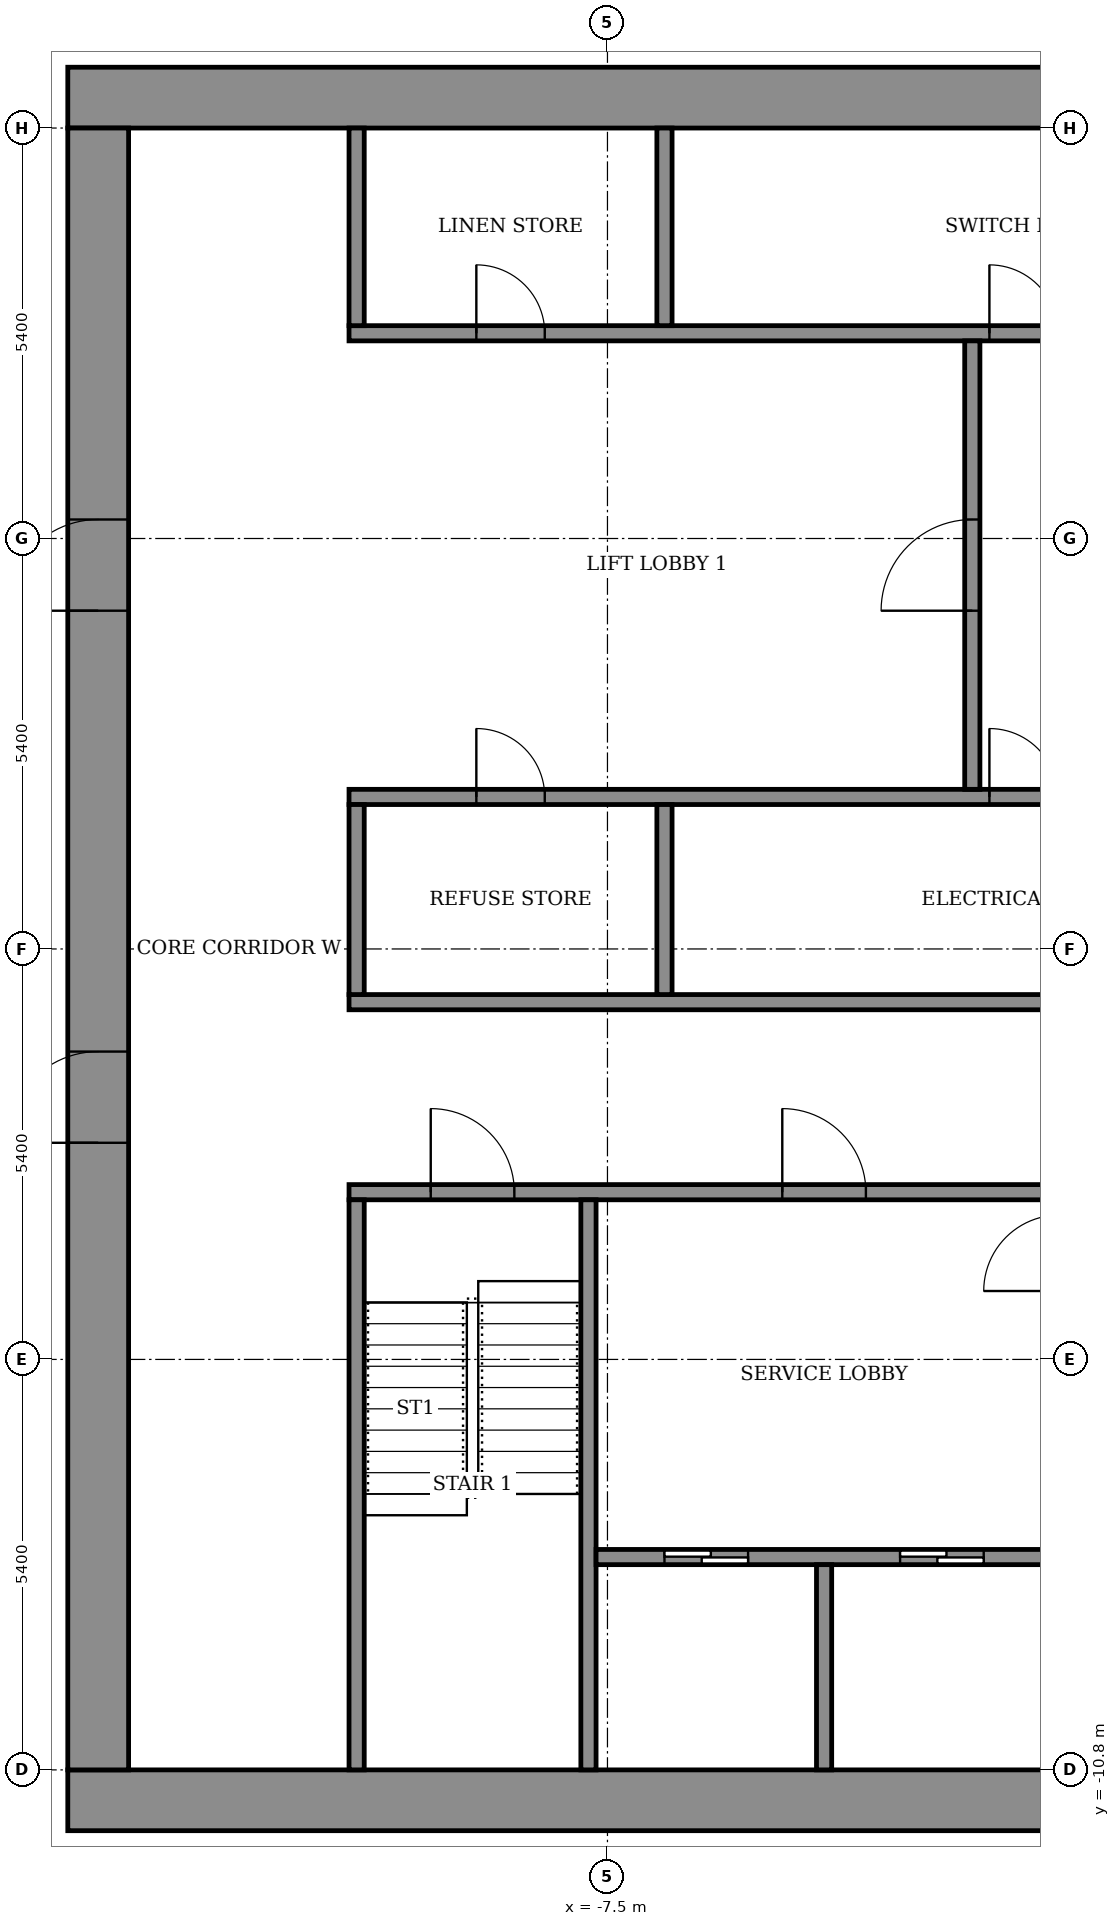
"""IFC4 building model, lengths in metres.
Left out: names, types, materials, properties, quantities, classifications, styles, units other than length and angle.
Written with IfcOpenShell. Run it as: python <this file> out.ifc"""

import sys

from ifc_helpers import new_model, si_unit, direction, frame, frame_2d, origin, place, context, subcontext, project, spatial, rectangle, extrude, element, fill, save


model = new_model("IFC4")
c1 = context("Model", 3, precision=1e-05, world=origin(), true_north=direction((0.0, 1.0)))
c2 = subcontext(c1, "Body", "Model", "MODEL_VIEW")
j1 = project(units=[si_unit("LENGTHUNIT", "METRE"), si_unit("PLANEANGLEUNIT", "RADIAN")], contexts=[c1])
p1 = place(None, origin())
s1 = spatial("IfcSite", under=j1, at=p1, CompositionType="ELEMENT")
p2 = place(p1, origin())
s2 = spatial("IfcBuilding", under=s1, at=p2, CompositionType="ELEMENT")
p3 = place(p2, frame((0.0, 0.0, 205.1)))
s3 = spatial("IfcBuildingStorey", under=s2, at=p3, CompositionType="ELEMENT", Elevation=205.1)
for number, where, z_axis, x_axis in (
    (1, (-14.6, -11.2, 0.0), (0.0, 0.0, 1.0), (1.0, 0.0, 0.0)),
    (2, (-14.6, 11.2, 0.0), (0.0, 0.0, 1.0), (1.0, 0.0, 0.0)),
):
    element("IfcWall", number, at=place(p3, frame(where, z_axis=z_axis, x_axis=x_axis)), inside=s3, PredefinedType="SHEAR", context=c2, shape_type="SweptSolid", body=[
        extrude(rectangle(XDim=29.2, YDim=0.8, at=frame_2d((14.6, 0.0))), origin(), (0.0, 0.0, 1.0), 3.6),
    ])
p4 = place(p3, frame((-14.2, -10.8, 0.0), z_axis=(0.0, 0.0, 1.0), x_axis=(0.0, 1.0, 0.0)))
e3 = element("IfcWall", 3, at=p4, inside=s3, PredefinedType="SHEAR", context=c2, shape_type="SweptSolid", body=[
    extrude(rectangle(XDim=21.6, YDim=0.8, at=frame_2d((10.8, 0.0))), origin(), (0.0, 0.0, 1.0), 3.6),
])
p5 = place(p4, frame((8.25, 0.0, 0.0)))
e4 = element("IfcOpeningElement", 4, at=p5, cuts=e3, PredefinedType="OPENING", context=c2, shape_type="SweptSolid", body=[
    extrude(rectangle(XDim=1.2, YDim=2.1, at=frame_2d((0.6, 1.05))), frame((0.0, 0.41, 0.0), z_axis=(0.0, -1.0, 0.0), x_axis=(1.0, 0.0, 0.0)), (0.0, 0.0, 1.0), 0.82),
])
p6 = place(p4, frame((15.25, 0.0, 0.0)))
e5 = element("IfcOpeningElement", 5, at=p6, cuts=e3, PredefinedType="OPENING", context=c2, shape_type="SweptSolid", body=[
    extrude(rectangle(XDim=1.2, YDim=2.1, at=frame_2d((0.6, 1.05))), frame((0.0, 0.41, 0.0), z_axis=(0.0, -1.0, 0.0), x_axis=(1.0, 0.0, 0.0)), (0.0, 0.0, 1.0), 0.82),
])
p7 = place(p3, frame((-10.9, -3.2, 0.0), z_axis=(0.0, 0.0, 1.0), x_axis=(1.0, 0.0, 0.0)))
e6 = element("IfcWall", 6, at=p7, inside=s3, PredefinedType="SHEAR", context=c2, shape_type="SweptSolid", body=[
    extrude(rectangle(XDim=21.8, YDim=0.2, at=frame_2d((10.9, 0.0))), origin(), (0.0, 0.0, 1.0), 3.05),
])
p8 = place(p7, frame((1.075, 0.0, 0.0)))
e7 = element("IfcOpeningElement", 7, at=p8, cuts=e6, PredefinedType="OPENING", context=c2, shape_type="SweptSolid", body=[
    extrude(rectangle(XDim=1.1, YDim=2.1, at=frame_2d((0.55, 1.05))), frame((0.0, 0.11, 0.0), z_axis=(0.0, -1.0, 0.0), x_axis=(1.0, 0.0, 0.0)), (0.0, 0.0, 1.0), 0.22),
])
p9 = place(p7, frame((10.325, 0.0, 0.0)))
e8 = element("IfcOpeningElement", 8, at=p9, cuts=e6, PredefinedType="OPENING", context=c2, shape_type="SweptSolid", body=[
    extrude(rectangle(XDim=1.1, YDim=2.1, at=frame_2d((0.55, 1.05))), frame((0.0, 0.11, 0.0), z_axis=(0.0, -1.0, 0.0), x_axis=(1.0, 0.0, 0.0)), (0.0, 0.0, 1.0), 0.22),
])
p10 = place(p7, frame((19.625, 0.0, 0.0)))
e9 = element("IfcOpeningElement", 9, at=p10, cuts=e6, PredefinedType="OPENING", context=c2, shape_type="SweptSolid", body=[
    extrude(rectangle(XDim=1.1, YDim=2.1, at=frame_2d((0.55, 1.05))), frame((0.0, 0.11, 0.0), z_axis=(0.0, -1.0, 0.0), x_axis=(1.0, 0.0, 0.0)), (0.0, 0.0, 1.0), 0.22),
])
p11 = place(p7, frame((5.7, 0.0, 0.0)))
e10 = element("IfcOpeningElement", 10, at=p11, cuts=e6, PredefinedType="OPENING", context=c2, shape_type="SweptSolid", body=[
    extrude(rectangle(XDim=1.1, YDim=2.1, at=frame_2d((0.55, 1.05))), frame((0.0, 0.11, 0.0), z_axis=(0.0, -1.0, 0.0), x_axis=(1.0, 0.0, 0.0)), (0.0, 0.0, 1.0), 0.22),
])
p12 = place(p7, frame((14.975, 0.0, 0.0)))
e11 = element("IfcOpeningElement", 11, at=p12, cuts=e6, PredefinedType="OPENING", context=c2, shape_type="SweptSolid", body=[
    extrude(rectangle(XDim=1.1, YDim=2.1, at=frame_2d((0.55, 1.05))), frame((0.0, 0.11, 0.0), z_axis=(0.0, -1.0, 0.0), x_axis=(1.0, 0.0, 0.0)), (0.0, 0.0, 1.0), 0.22),
])
p13 = place(p3, frame((-10.9, -0.7, 0.0), z_axis=(0.0, 0.0, 1.0), x_axis=(1.0, 0.0, 0.0)))
e12 = element("IfcWall", 12, at=p13, inside=s3, PredefinedType="SHEAR", context=c2, shape_type="SweptSolid", body=[
    extrude(rectangle(XDim=21.8, YDim=0.2, at=frame_2d((10.9, 0.0))), origin(), (0.0, 0.0, 1.0), 3.05),
])
p14 = place(p3, frame((-10.9, 2.0, 0.0), z_axis=(0.0, 0.0, 1.0), x_axis=(1.0, 0.0, 0.0)))
e13 = element("IfcWall", 13, at=p14, inside=s3, PredefinedType="SHEAR", context=c2, shape_type="SweptSolid", body=[
    extrude(rectangle(XDim=21.8, YDim=0.2, at=frame_2d((10.9, 0.0))), origin(), (0.0, 0.0, 1.0), 3.05),
])
p15 = place(p14, frame((14.4, 0.0, 0.0)))
e14 = element("IfcOpeningElement", 14, at=p15, cuts=e13, PredefinedType="OPENING", context=c2, shape_type="SweptSolid", body=[
    extrude(rectangle(XDim=1.1, YDim=2.1, at=frame_2d((0.55, 1.05))), frame((0.0, 0.11, 0.0), z_axis=(0.0, -1.0, 0.0), x_axis=(1.0, 0.0, 0.0)), (0.0, 0.0, 1.0), 0.22),
])
p16 = place(p14, frame((17.1, 0.0, 0.0)))
e15 = element("IfcOpeningElement", 15, at=p16, cuts=e13, PredefinedType="OPENING", context=c2, shape_type="SweptSolid", body=[
    extrude(rectangle(XDim=1.1, YDim=2.1, at=frame_2d((0.55, 1.05))), frame((0.0, 0.11, 0.0), z_axis=(0.0, -1.0, 0.0), x_axis=(1.0, 0.0, 0.0)), (0.0, 0.0, 1.0), 0.22),
])
p17 = place(p14, frame((19.8, 0.0, 0.0)))
e16 = element("IfcOpeningElement", 16, at=p17, cuts=e13, PredefinedType="OPENING", context=c2, shape_type="SweptSolid", body=[
    extrude(rectangle(XDim=1.1, YDim=2.1, at=frame_2d((0.55, 1.05))), frame((0.0, 0.11, 0.0), z_axis=(0.0, -1.0, 0.0), x_axis=(1.0, 0.0, 0.0)), (0.0, 0.0, 1.0), 0.22),
])
p18 = place(p14, frame((1.675, 0.0, 0.0)))
e17 = element("IfcOpeningElement", 17, at=p18, cuts=e13, PredefinedType="OPENING", context=c2, shape_type="SweptSolid", body=[
    extrude(rectangle(XDim=0.9, YDim=2.1, at=frame_2d((0.45, 1.05))), frame((0.0, 0.11, 0.0), z_axis=(0.0, -1.0, 0.0), x_axis=(1.0, 0.0, 0.0)), (0.0, 0.0, 1.0), 0.22),
])
p19 = place(p14, frame((8.425, 0.0, 0.0)))
e18 = element("IfcOpeningElement", 18, at=p19, cuts=e13, PredefinedType="OPENING", context=c2, shape_type="SweptSolid", body=[
    extrude(rectangle(XDim=0.9, YDim=2.1, at=frame_2d((0.45, 1.05))), frame((0.0, 0.11, 0.0), z_axis=(0.0, -1.0, 0.0), x_axis=(1.0, 0.0, 0.0)), (0.0, 0.0, 1.0), 0.22),
])
p20 = place(p3, frame((-10.9, 8.1, 0.0), z_axis=(0.0, 0.0, 1.0), x_axis=(1.0, 0.0, 0.0)))
e19 = element("IfcWall", 19, at=p20, inside=s3, PredefinedType="SHEAR", context=c2, shape_type="SweptSolid", body=[
    extrude(rectangle(XDim=21.8, YDim=0.2, at=frame_2d((10.9, 0.0))), origin(), (0.0, 0.0, 1.0), 3.05),
])
p21 = place(p20, frame((14.4, 0.0, 0.0)))
e20 = element("IfcOpeningElement", 20, at=p21, cuts=e19, PredefinedType="OPENING", context=c2, shape_type="SweptSolid", body=[
    extrude(rectangle(XDim=1.1, YDim=2.1, at=frame_2d((0.55, 1.05))), frame((0.0, 0.11, 0.0), z_axis=(0.0, -1.0, 0.0), x_axis=(1.0, 0.0, 0.0)), (0.0, 0.0, 1.0), 0.22),
])
p22 = place(p20, frame((17.1, 0.0, 0.0)))
e21 = element("IfcOpeningElement", 21, at=p22, cuts=e19, PredefinedType="OPENING", context=c2, shape_type="SweptSolid", body=[
    extrude(rectangle(XDim=1.1, YDim=2.1, at=frame_2d((0.55, 1.05))), frame((0.0, 0.11, 0.0), z_axis=(0.0, -1.0, 0.0), x_axis=(1.0, 0.0, 0.0)), (0.0, 0.0, 1.0), 0.22),
])
p23 = place(p20, frame((19.8, 0.0, 0.0)))
e22 = element("IfcOpeningElement", 22, at=p23, cuts=e19, PredefinedType="OPENING", context=c2, shape_type="SweptSolid", body=[
    extrude(rectangle(XDim=1.1, YDim=2.1, at=frame_2d((0.55, 1.05))), frame((0.0, 0.11, 0.0), z_axis=(0.0, -1.0, 0.0), x_axis=(1.0, 0.0, 0.0)), (0.0, 0.0, 1.0), 0.22),
])
p24 = place(p20, frame((1.675, 0.0, 0.0)))
e23 = element("IfcOpeningElement", 23, at=p24, cuts=e19, PredefinedType="OPENING", context=c2, shape_type="SweptSolid", body=[
    extrude(rectangle(XDim=0.9, YDim=2.1, at=frame_2d((0.45, 1.05))), frame((0.0, 0.11, 0.0), z_axis=(0.0, -1.0, 0.0), x_axis=(1.0, 0.0, 0.0)), (0.0, 0.0, 1.0), 0.22),
])
p25 = place(p20, frame((8.425, 0.0, 0.0)))
e24 = element("IfcOpeningElement", 24, at=p25, cuts=e19, PredefinedType="OPENING", context=c2, shape_type="SweptSolid", body=[
    extrude(rectangle(XDim=0.9, YDim=2.1, at=frame_2d((0.45, 1.05))), frame((0.0, 0.11, 0.0), z_axis=(0.0, -1.0, 0.0), x_axis=(1.0, 0.0, 0.0)), (0.0, 0.0, 1.0), 0.22),
])
for number, where, z_axis, x_axis in (
    (25, (-10.8, -10.8, 0.0), (0.0, 0.0, 1.0), (0.0, 1.0, 0.0)),
    (26, (-7.75, -10.8, 0.0), (0.0, 0.0, 1.0), (0.0, 1.0, 0.0)),
):
    element("IfcWall", number, at=place(p3, frame(where, z_axis=z_axis, x_axis=x_axis)), inside=s3, PredefinedType="SHEAR", context=c2, shape_type="SweptSolid", body=[
        extrude(rectangle(XDim=7.5, YDim=0.2, at=frame_2d((3.75, 0.0))), origin(), (0.0, 0.0, 1.0), 3.05),
    ])
p26 = place(p3, frame((-7.65, -8.0, 0.0), z_axis=(0.0, 0.0, 1.0), x_axis=(1.0, 0.0, 0.0)))
e27 = element("IfcWall", 27, at=p26, inside=s3, PredefinedType="SHEAR", context=c2, shape_type="SweptSolid", body=[
    extrude(rectangle(XDim=6.0, YDim=0.2, at=frame_2d((3.0, 0.0))), origin(), (0.0, 0.0, 1.0), 3.05),
])
p27 = place(p26, frame((0.9, 0.0, 0.0)))
e28 = element("IfcOpeningElement", 28, at=p27, cuts=e27, PredefinedType="OPENING", context=c2, shape_type="SweptSolid", body=[
    extrude(rectangle(XDim=1.1, YDim=2.1, at=frame_2d((0.55, 1.05))), frame((0.0, 0.11, 0.0), z_axis=(0.0, -1.0, 0.0), x_axis=(1.0, 0.0, 0.0)), (0.0, 0.0, 1.0), 0.22),
])
p28 = place(p26, frame((4.0, 0.0, 0.0)))
e29 = element("IfcOpeningElement", 29, at=p28, cuts=e27, PredefinedType="OPENING", context=c2, shape_type="SweptSolid", body=[
    extrude(rectangle(XDim=1.1, YDim=2.1, at=frame_2d((0.55, 1.05))), frame((0.0, 0.11, 0.0), z_axis=(0.0, -1.0, 0.0), x_axis=(1.0, 0.0, 0.0)), (0.0, 0.0, 1.0), 0.22),
])
p29 = place(p3, frame((-4.65, -10.8, 0.0), z_axis=(0.0, 0.0, 1.0), x_axis=(0.0, 1.0, 0.0)))
e30 = element("IfcWall", 30, at=p29, inside=s3, PredefinedType="SHEAR", context=c2, shape_type="SweptSolid", body=[
    extrude(rectangle(XDim=2.7, YDim=0.2, at=frame_2d((1.35, 0.0))), origin(), (0.0, 0.0, 1.0), 3.05),
])
for number, where, z_axis, x_axis in (
    (31, (-10.8, -0.6, 0.0), (0.0, 0.0, 1.0), (0.0, 1.0, 0.0)),
    (32, (-6.75, -0.6, 0.0), (0.0, 0.0, 1.0), (0.0, 1.0, 0.0)),
):
    element("IfcWall", number, at=place(p3, frame(where, z_axis=z_axis, x_axis=x_axis)), inside=s3, PredefinedType="STANDARD", context=c2, shape_type="SweptSolid", body=[
        extrude(rectangle(XDim=2.5, YDim=0.2, at=frame_2d((1.25, 0.0))), origin(), (0.0, 0.0, 1.0), 3.05),
    ])
for number, where, z_axis, x_axis in (
    (33, (-10.8, 8.2, 0.0), (0.0, 0.0, 1.0), (0.0, 1.0, 0.0)),
    (34, (-6.75, 8.2, 0.0), (0.0, 0.0, 1.0), (0.0, 1.0, 0.0)),
):
    element("IfcWall", number, at=place(p3, frame(where, z_axis=z_axis, x_axis=x_axis)), inside=s3, PredefinedType="STANDARD", context=c2, shape_type="SweptSolid", body=[
        extrude(rectangle(XDim=2.6, YDim=0.2, at=frame_2d((1.3, 0.0))), origin(), (0.0, 0.0, 1.0), 3.05),
    ])
p30 = place(p3, frame((-2.7, 2.1, 0.0), z_axis=(0.0, 0.0, 1.0), x_axis=(0.0, 1.0, 0.0)))
e35 = element("IfcWall", 35, at=p30, inside=s3, PredefinedType="STANDARD", context=c2, shape_type="SweptSolid", body=[
    extrude(rectangle(XDim=5.9, YDim=0.2, at=frame_2d((2.95, 0.0))), origin(), (0.0, 0.0, 1.0), 3.05),
])
p31 = place(p30, frame((2.35, 0.0, 0.0)))
e36 = element("IfcOpeningElement", 36, at=p31, cuts=e35, PredefinedType="OPENING", context=c2, shape_type="SweptSolid", body=[
    extrude(rectangle(XDim=1.2, YDim=2.1, at=frame_2d((0.6, 1.05))), frame((0.0, 0.11, 0.0), z_axis=(0.0, -1.0, 0.0), x_axis=(1.0, 0.0, 0.0)), (0.0, 0.0, 1.0), 0.22),
])
p32 = place(p5, origin())
e37 = element("IfcDoor", 37, at=p32, inside=s3, OperationType="DOUBLE_DOOR_SINGLE_SWING", PredefinedType="DOOR", context=c2, shape_type="SweptSolid", body=[
    extrude(rectangle(XDim=1.2, YDim=2.1, at=frame_2d((0.6, 1.05))), frame((0.0, 0.025, 0.0), z_axis=(0.0, -1.0, 0.0), x_axis=(1.0, 0.0, 0.0)), (0.0, 0.0, 1.0), 0.05),
])
fill(e4, e37)
p33 = place(p6, origin())
e38 = element("IfcDoor", 38, at=p33, inside=s3, OperationType="DOUBLE_DOOR_SINGLE_SWING", PredefinedType="DOOR", context=c2, shape_type="SweptSolid", body=[
    extrude(rectangle(XDim=1.2, YDim=2.1, at=frame_2d((0.6, 1.05))), frame((0.0, 0.025, 0.0), z_axis=(0.0, -1.0, 0.0), x_axis=(1.0, 0.0, 0.0)), (0.0, 0.0, 1.0), 0.05),
])
fill(e5, e38)
p34 = place(p18, origin())
e39 = element("IfcDoor", 39, at=p34, inside=s3, OperationType="SINGLE_SWING_RIGHT", PredefinedType="DOOR", context=c2, shape_type="SweptSolid", body=[
    extrude(rectangle(XDim=0.9, YDim=2.1, at=frame_2d((0.45, 1.05))), frame((0.0, 0.025, 0.0), z_axis=(0.0, -1.0, 0.0), x_axis=(1.0, 0.0, 0.0)), (0.0, 0.0, 1.0), 0.05),
])
fill(e17, e39)
p35 = place(p19, origin())
e40 = element("IfcDoor", 40, at=p35, inside=s3, OperationType="SINGLE_SWING_LEFT", PredefinedType="DOOR", context=c2, shape_type="SweptSolid", body=[
    extrude(rectangle(XDim=0.9, YDim=2.1, at=frame_2d((0.45, 1.05))), frame((0.0, 0.025, 0.0), z_axis=(0.0, -1.0, 0.0), x_axis=(1.0, 0.0, 0.0)), (0.0, 0.0, 1.0), 0.05),
])
fill(e18, e40)
p36 = place(p24, origin())
e41 = element("IfcDoor", 41, at=p36, inside=s3, OperationType="SINGLE_SWING_RIGHT", PredefinedType="DOOR", context=c2, shape_type="SweptSolid", body=[
    extrude(rectangle(XDim=0.9, YDim=2.1, at=frame_2d((0.45, 1.05))), frame((0.0, 0.025, 0.0), z_axis=(0.0, -1.0, 0.0), x_axis=(1.0, 0.0, 0.0)), (0.0, 0.0, 1.0), 0.05),
])
fill(e23, e41)
p37 = place(p25, origin())
e42 = element("IfcDoor", 42, at=p37, inside=s3, OperationType="SINGLE_SWING_LEFT", PredefinedType="DOOR", context=c2, shape_type="SweptSolid", body=[
    extrude(rectangle(XDim=0.9, YDim=2.1, at=frame_2d((0.45, 1.05))), frame((0.0, 0.025, 0.0), z_axis=(0.0, -1.0, 0.0), x_axis=(1.0, 0.0, 0.0)), (0.0, 0.0, 1.0), 0.05),
])
fill(e24, e42)
p38 = place(p27, origin())
e43 = element("IfcDoor", 43, at=p38, inside=s3, OperationType="SLIDING_TO_LEFT", PredefinedType="DOOR", context=c2, shape_type="SweptSolid", body=[
    extrude(rectangle(XDim=1.1, YDim=2.1, at=frame_2d((0.55, 1.05))), frame((0.0, 0.025, 0.0), z_axis=(0.0, -1.0, 0.0), x_axis=(1.0, 0.0, 0.0)), (0.0, 0.0, 1.0), 0.05),
])
fill(e28, e43)
p39 = place(p28, origin())
e44 = element("IfcDoor", 44, at=p39, inside=s3, OperationType="SLIDING_TO_LEFT", PredefinedType="DOOR", context=c2, shape_type="SweptSolid", body=[
    extrude(rectangle(XDim=1.1, YDim=2.1, at=frame_2d((0.55, 1.05))), frame((0.0, 0.025, 0.0), z_axis=(0.0, -1.0, 0.0), x_axis=(1.0, 0.0, 0.0)), (0.0, 0.0, 1.0), 0.05),
])
fill(e29, e44)
p40 = place(p8, origin())
e45 = element("IfcDoor", 45, at=p40, inside=s3, OperationType="SINGLE_SWING_RIGHT", PredefinedType="DOOR", context=c2, shape_type="SweptSolid", body=[
    extrude(rectangle(XDim=1.1, YDim=2.1, at=frame_2d((0.55, 1.05))), frame((0.0, 0.025, 0.0), z_axis=(0.0, -1.0, 0.0), x_axis=(1.0, 0.0, 0.0)), (0.0, 0.0, 1.0), 0.05),
])
fill(e7, e45)
p41 = place(p11, origin())
e46 = element("IfcDoor", 46, at=p41, inside=s3, OperationType="SINGLE_SWING_LEFT", PredefinedType="DOOR", context=c2, shape_type="SweptSolid", body=[
    extrude(rectangle(XDim=1.1, YDim=2.1, at=frame_2d((0.55, 1.05))), frame((0.0, 0.025, 0.0), z_axis=(0.0, -1.0, 0.0), x_axis=(1.0, 0.0, 0.0)), (0.0, 0.0, 1.0), 0.05),
])
fill(e10, e46)
p42 = place(p31, origin())
e47 = element("IfcDoor", 47, at=p42, inside=s3, OperationType="SINGLE_SWING_LEFT", PredefinedType="DOOR", context=c2, shape_type="SweptSolid", body=[
    extrude(rectangle(XDim=1.2, YDim=2.1, at=frame_2d((0.6, 1.05))), frame((0.0, 0.025, 0.0), z_axis=(0.0, -1.0, 0.0), x_axis=(1.0, 0.0, 0.0)), (0.0, 0.0, 1.0), 0.05),
])
fill(e36, e47)
save(model, sys.argv[1])
